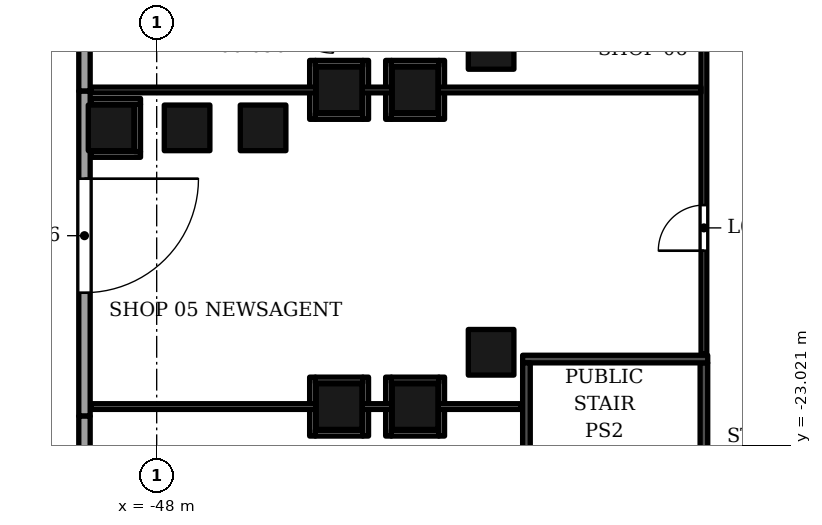
"""IFC4 building model, lengths in metres.
Left out: names, types, materials, properties, quantities, classifications, styles, units other than length and angle.
Written with IfcOpenShell. Run it as: python <this file> out.ifc"""

import sys

from ifc_helpers import new_model, si_unit, direction, frame, frame_2d, origin, origin_2d, place, context, subcontext, project, spatial, rectangle, extrude, element, fill, save


model = new_model("IFC4")
c1 = context("Model", 3, precision=1e-05, world=origin(), true_north=direction((0.0, 1.0)))
c2 = subcontext(c1, "Body", "Model", "MODEL_VIEW")
j1 = project(units=[si_unit("LENGTHUNIT", "METRE"), si_unit("PLANEANGLEUNIT", "RADIAN")], contexts=[c1])
p1 = place(None, origin())
s1 = spatial("IfcSite", under=j1, at=p1, CompositionType="ELEMENT")
p2 = place(p1, origin())
s2 = spatial("IfcBuilding", under=s1, at=p2, CompositionType="ELEMENT")
p3 = place(p2, origin())
s3 = spatial("IfcBuildingStorey", under=s2, at=p3, CompositionType="ELEMENT", Elevation=0.0)
for number, where, z_axis, x_axis in (
    (1, (-39.2, -20.572, 0.0), (0.0, 0.0, 1.0), (1.0, 0.0, 0.0)),
    (2, (-39.2, -12.524, 0.0), (0.0, 0.0, 1.0), (1.0, 0.0, 0.0)),
    (3, (-41.2, -22.001, 0.0), (0.0, 0.0, 1.0), (1.0, 0.0, 0.0)),
    (4, (-41.2, -13.667, 0.0), (0.0, 0.0, 1.0), (1.0, 0.0, 0.0)),
    (5, (-43.2, -22.001, 0.0), (0.0, 0.0, 1.0), (1.0, 0.0, 0.0)),
    (6, (-43.2, -13.667, 0.0), (0.0, 0.0, 1.0), (1.0, 0.0, 0.0)),
    (7, (-45.2, -14.667, 0.0), (0.0, 0.0, 1.0), (1.0, 0.0, 0.0)),
    (8, (-47.2, -14.667, 0.0), (0.0, 0.0, 1.0), (1.0, 0.0, 0.0)),
    (9, (-49.2, -14.667, 0.0), (0.0, 0.0, 1.0), (1.0, 0.0, 0.0)),
):
    element("IfcColumn", number, at=place(p3, frame(where, z_axis=z_axis, x_axis=x_axis)), inside=s3, PredefinedType="COLUMN", context=c2, shape_type="SweptSolid", body=[
        extrude(rectangle(XDim=1.2, YDim=1.2, at=origin_2d()), origin(), (0.0, 0.0, 1.0), 9.0),
    ])
p4 = place(p3, frame((-49.9, -7.027, 0.0), z_axis=(0.0, 0.0, 1.0), x_axis=(0.0, -1.0, 0.0)))
e10 = element("IfcWall", 10, at=p4, inside=s3, PredefinedType="ELEMENTEDWALL", context=c2, shape_type="SweptSolid", body=[
    extrude(rectangle(XDim=6.675, YDim=0.3, at=frame_2d((3.337, 0.0))), origin(), (0.0, 0.0, 1.0), 7.6),
])
p5 = place(p4, frame((2.373, 0.0, 0.0)))
e11 = element("IfcOpeningElement", 11, at=p5, cuts=e10, PredefinedType="OPENING", context=c2, shape_type="SweptSolid", body=[
    extrude(rectangle(XDim=2.0, YDim=2.4, at=frame_2d((1.0, 1.2))), frame((0.0, 0.16, 0.0), z_axis=(0.0, -1.0, 0.0), x_axis=(1.0, 0.0, 0.0)), (0.0, 0.0, 1.0), 0.32),
])
p6 = place(p3, frame((-49.9, -13.702, 0.0), z_axis=(0.0, 0.0, 1.0), x_axis=(0.0, -1.0, 0.0)))
e12 = element("IfcWall", 12, at=p6, inside=s3, PredefinedType="ELEMENTEDWALL", context=c2, shape_type="SweptSolid", body=[
    extrude(rectangle(XDim=8.55, YDim=0.3, at=frame_2d((4.275, 0.0))), origin(), (0.0, 0.0, 1.0), 7.6),
])
p7 = place(p6, frame((2.302, 0.0, 0.0)))
e13 = element("IfcOpeningElement", 13, at=p7, cuts=e12, PredefinedType="OPENING", context=c2, shape_type="SweptSolid", body=[
    extrude(rectangle(XDim=3.0, YDim=2.7, at=frame_2d((1.5, 1.35))), frame((0.0, 0.16, 0.0), z_axis=(0.0, -1.0, 0.0), x_axis=(1.0, 0.0, 0.0)), (0.0, 0.0, 1.0), 0.32),
])
p8 = place(p3, frame((-49.9, -22.252, 0.0), z_axis=(0.0, 0.0, 1.0), x_axis=(0.0, -1.0, 0.0)))
e14 = element("IfcWall", 14, at=p8, inside=s3, PredefinedType="ELEMENTEDWALL", context=c2, shape_type="SweptSolid", body=[
    extrude(rectangle(XDim=5.625, YDim=0.3, at=frame_2d((2.812, 0.0))), origin(), (0.0, 0.0, 1.0), 7.6),
])
p9 = place(p8, frame((3.248, 0.0, 0.0)))
e15 = element("IfcOpeningElement", 15, at=p9, cuts=e14, PredefinedType="OPENING", context=c2, shape_type="SweptSolid", body=[
    extrude(rectangle(XDim=2.0, YDim=2.4, at=frame_2d((1.0, 1.2))), frame((0.0, 0.16, 0.0), z_axis=(0.0, -1.0, 0.0), x_axis=(1.0, 0.0, 0.0)), (0.0, 0.0, 1.0), 0.32),
])
p10 = place(p3, frame((-49.85, -10.605, 9.0), z_axis=(0.0, 0.0, 1.0), x_axis=(0.0, -1.0, 0.0)))
e16 = element("IfcWall", 16, at=p10, inside=s3, PredefinedType="PARAPET", context=c2, shape_type="SweptSolid", body=[
    extrude(rectangle(XDim=14.698, YDim=0.3, at=frame_2d((7.349, 0.0))), origin(), (0.0, 0.0, 1.0), 1.1),
])
p11 = place(p3, frame((-38.37, -20.75, 0.0), z_axis=(0.0, 0.0, 1.0), x_axis=(1.0, 0.0, 0.0)))
e17 = element("IfcWall", 17, at=p11, inside=s3, PredefinedType="SOLIDWALL", context=c2, shape_type="SweptSolid", body=[
    extrude(rectangle(XDim=4.87, YDim=0.2, at=frame_2d((2.435, 0.0))), origin(), (0.0, 0.0, 1.0), 8.5),
])
p12 = place(p3, frame((-38.27, -27.5, 0.0), z_axis=(0.0, 0.0, 1.0), x_axis=(0.0, 1.0, 0.0)))
e18 = element("IfcWall", 18, at=p12, inside=s3, PredefinedType="SOLIDWALL", context=c2, shape_type="SweptSolid", body=[
    extrude(rectangle(XDim=6.65, YDim=0.2, at=frame_2d((3.325, 0.0))), origin(), (0.0, 0.0, 1.0), 8.5),
])
p13 = place(p12, frame((0.1, 0.0, 0.0)))
e19 = element("IfcOpeningElement", 19, at=p13, cuts=e18, PredefinedType="OPENING", context=c2, shape_type="SweptSolid", body=[
    extrude(rectangle(XDim=1.8, YDim=2.4, at=frame_2d((0.9, 1.2))), frame((0.0, 0.11, 0.0), z_axis=(0.0, -1.0, 0.0), x_axis=(1.0, 0.0, 0.0)), (0.0, 0.0, 1.0), 0.22),
])
p14 = place(p3, frame((-33.6, -27.5, 0.0), z_axis=(0.0, 0.0, 1.0), x_axis=(0.0, 1.0, 0.0)))
e20 = element("IfcWall", 20, at=p14, inside=s3, PredefinedType="SOLIDWALL", context=c2, shape_type="SweptSolid", body=[
    extrude(rectangle(XDim=6.65, YDim=0.2, at=frame_2d((3.325, 0.0))), origin(), (0.0, 0.0, 1.0), 8.5),
])
p15 = place(p14, frame((0.1, 0.0, 0.0)))
e21 = element("IfcOpeningElement", 21, at=p15, cuts=e20, PredefinedType="OPENING", context=c2, shape_type="SweptSolid", body=[
    extrude(rectangle(XDim=1.8, YDim=2.4, at=frame_2d((0.9, 1.2))), frame((0.0, 0.11, 0.0), z_axis=(0.0, -1.0, 0.0), x_axis=(1.0, 0.0, 0.0)), (0.0, 0.0, 1.0), 0.22),
])
p16 = place(p3, frame((-43.9, -22.776, 0.0), z_axis=(0.0, 0.0, 1.0), x_axis=(0.0, 1.0, 0.0)))
e22 = element("IfcWall", 22, at=p16, inside=s3, PredefinedType="PARTITIONING", context=c2, shape_type="SweptSolid", body=[
    extrude(rectangle(XDim=1.55, YDim=0.15, at=frame_2d((0.775, 0.0))), origin(), (0.0, 0.0, 1.0), 8.5),
])
p17 = place(p3, frame((-43.825, -22.701, 0.0), z_axis=(0.0, 0.0, 1.0), x_axis=(1.0, 0.0, 0.0)))
e23 = element("IfcWall", 23, at=p17, inside=s3, PredefinedType="PARTITIONING", context=c2, shape_type="SweptSolid", body=[
    extrude(rectangle(XDim=1.25, YDim=0.15, at=frame_2d((0.625, 0.0))), origin(), (0.0, 0.0, 1.0), 8.5),
])
for number, where, z_axis, x_axis in (
    (24, (-42.5, -22.776, 0.0), (0.0, 0.0, 1.0), (0.0, 1.0, 0.0)),
    (25, (-41.9, -22.776, 0.0), (0.0, 0.0, 1.0), (0.0, 1.0, 0.0)),
):
    element("IfcWall", number, at=place(p3, frame(where, z_axis=z_axis, x_axis=x_axis)), inside=s3, PredefinedType="PARTITIONING", context=c2, shape_type="SweptSolid", body=[
        extrude(rectangle(XDim=1.55, YDim=0.15, at=frame_2d((0.775, 0.0))), origin(), (0.0, 0.0, 1.0), 8.5),
    ])
p18 = place(p3, frame((-41.825, -22.701, 0.0), z_axis=(0.0, 0.0, 1.0), x_axis=(1.0, 0.0, 0.0)))
e26 = element("IfcWall", 26, at=p18, inside=s3, PredefinedType="PARTITIONING", context=c2, shape_type="SweptSolid", body=[
    extrude(rectangle(XDim=1.25, YDim=0.15, at=frame_2d((0.625, 0.0))), origin(), (0.0, 0.0, 1.0), 8.5),
])
p19 = place(p3, frame((-40.5, -22.776, 0.0), z_axis=(0.0, 0.0, 1.0), x_axis=(0.0, 1.0, 0.0)))
e27 = element("IfcWall", 27, at=p19, inside=s3, PredefinedType="PARTITIONING", context=c2, shape_type="SweptSolid", body=[
    extrude(rectangle(XDim=1.55, YDim=0.15, at=frame_2d((0.775, 0.0))), origin(), (0.0, 0.0, 1.0), 8.5),
])
p20 = place(p3, frame((-49.72, -22.0, 0.0), z_axis=(0.0, 0.0, 1.0), x_axis=(1.0, 0.0, 0.0)))
e28 = element("IfcWall", 28, at=p20, inside=s3, PredefinedType="PARTITIONING", context=c2, shape_type="SweptSolid", body=[
    extrude(rectangle(XDim=5.92, YDim=0.15, at=frame_2d((2.96, 0.0))), origin(), (0.0, 0.0, 1.0), 7.6),
])
p21 = place(p3, frame((-42.6, -22.0, 0.0), z_axis=(0.0, 0.0, 1.0), x_axis=(1.0, 0.0, 0.0)))
e29 = element("IfcWall", 29, at=p21, inside=s3, PredefinedType="PARTITIONING", context=c2, shape_type="SweptSolid", body=[
    extrude(rectangle(XDim=0.8, YDim=0.15, at=frame_2d((0.4, 0.0))), origin(), (0.0, 0.0, 1.0), 8.5),
])
p22 = place(p3, frame((-40.6, -22.0, 0.0), z_axis=(0.0, 0.0, 1.0), x_axis=(1.0, 0.0, 0.0)))
e30 = element("IfcWall", 30, at=p22, inside=s3, PredefinedType="PARTITIONING", context=c2, shape_type="SweptSolid", body=[
    extrude(rectangle(XDim=2.19, YDim=0.15, at=frame_2d((1.095, 0.0))), origin(), (0.0, 0.0, 1.0), 8.5),
])
for number, where, z_axis, x_axis in (
    (31, (-43.825, -21.301, 0.0), (0.0, 0.0, 1.0), (1.0, 0.0, 0.0)),
    (32, (-41.825, -21.301, 0.0), (0.0, 0.0, 1.0), (1.0, 0.0, 0.0)),
):
    element("IfcWall", number, at=place(p3, frame(where, z_axis=z_axis, x_axis=x_axis)), inside=s3, PredefinedType="PARTITIONING", context=c2, shape_type="SweptSolid", body=[
        extrude(rectangle(XDim=1.25, YDim=0.15, at=frame_2d((0.625, 0.0))), origin(), (0.0, 0.0, 1.0), 8.5),
    ])
p23 = place(p3, frame((-33.6, -20.61, 0.0), z_axis=(0.0, 0.0, 1.0), x_axis=(0.0, 1.0, 0.0)))
e33 = element("IfcWall", 33, at=p23, inside=s3, PredefinedType="PARTITIONING", context=c2, shape_type="SweptSolid", body=[
    extrude(rectangle(XDim=8.97, YDim=0.15, at=frame_2d((4.485, 0.0))), origin(), (0.0, 0.0, 1.0), 8.5),
])
p24 = place(p23, frame((2.711, 0.0, 0.0)))
e34 = element("IfcOpeningElement", 34, at=p24, cuts=e33, PredefinedType="OPENING", context=c2, shape_type="SweptSolid", body=[
    extrude(rectangle(XDim=1.2, YDim=2.1, at=frame_2d((0.6, 1.05))), frame((0.0, 0.085, 0.0), z_axis=(0.0, -1.0, 0.0), x_axis=(1.0, 0.0, 0.0)), (0.0, 0.0, 1.0), 0.17),
])
p25 = place(p3, frame((-49.72, -15.367, 0.0), z_axis=(0.0, 0.0, 1.0), x_axis=(1.0, 0.0, 0.0)))
e35 = element("IfcWall", 35, at=p25, inside=s3, PredefinedType="PARTITIONING", context=c2, shape_type="SweptSolid", body=[
    extrude(rectangle(XDim=1.295, YDim=0.15, at=frame_2d((0.647, 0.0))), origin(), (0.0, 0.0, 1.0), 8.5),
])
p26 = place(p3, frame((-48.5, -15.292, 0.0), z_axis=(0.0, 0.0, 1.0), x_axis=(0.0, 1.0, 0.0)))
e36 = element("IfcWall", 36, at=p26, inside=s3, PredefinedType="PARTITIONING", context=c2, shape_type="SweptSolid", body=[
    extrude(rectangle(XDim=1.25, YDim=0.15, at=frame_2d((0.625, 0.0))), origin(), (0.0, 0.0, 1.0), 8.5),
])
p27 = place(p3, frame((-43.9, -14.442, 0.0), z_axis=(0.0, 0.0, 1.0), x_axis=(0.0, 1.0, 0.0)))
e37 = element("IfcWall", 37, at=p27, inside=s3, PredefinedType="PARTITIONING", context=c2, shape_type="SweptSolid", body=[
    extrude(rectangle(XDim=1.55, YDim=0.15, at=frame_2d((0.775, 0.0))), origin(), (0.0, 0.0, 1.0), 8.5),
])
p28 = place(p3, frame((-43.825, -14.367, 0.0), z_axis=(0.0, 0.0, 1.0), x_axis=(1.0, 0.0, 0.0)))
e38 = element("IfcWall", 38, at=p28, inside=s3, PredefinedType="PARTITIONING", context=c2, shape_type="SweptSolid", body=[
    extrude(rectangle(XDim=1.25, YDim=0.15, at=frame_2d((0.625, 0.0))), origin(), (0.0, 0.0, 1.0), 8.5),
])
for number, where, z_axis, x_axis in (
    (39, (-42.5, -14.442, 0.0), (0.0, 0.0, 1.0), (0.0, 1.0, 0.0)),
    (40, (-41.9, -14.442, 0.0), (0.0, 0.0, 1.0), (0.0, 1.0, 0.0)),
):
    element("IfcWall", number, at=place(p3, frame(where, z_axis=z_axis, x_axis=x_axis)), inside=s3, PredefinedType="PARTITIONING", context=c2, shape_type="SweptSolid", body=[
        extrude(rectangle(XDim=1.55, YDim=0.15, at=frame_2d((0.775, 0.0))), origin(), (0.0, 0.0, 1.0), 8.5),
    ])
p29 = place(p3, frame((-41.825, -14.367, 0.0), z_axis=(0.0, 0.0, 1.0), x_axis=(1.0, 0.0, 0.0)))
e41 = element("IfcWall", 41, at=p29, inside=s3, PredefinedType="PARTITIONING", context=c2, shape_type="SweptSolid", body=[
    extrude(rectangle(XDim=1.25, YDim=0.15, at=frame_2d((0.625, 0.0))), origin(), (0.0, 0.0, 1.0), 8.5),
])
p30 = place(p3, frame((-40.5, -14.442, 0.0), z_axis=(0.0, 0.0, 1.0), x_axis=(0.0, 1.0, 0.0)))
e42 = element("IfcWall", 42, at=p30, inside=s3, PredefinedType="PARTITIONING", context=c2, shape_type="SweptSolid", body=[
    extrude(rectangle(XDim=1.55, YDim=0.15, at=frame_2d((0.775, 0.0))), origin(), (0.0, 0.0, 1.0), 8.5),
])
p31 = place(p3, frame((-49.72, -13.967, 0.0), z_axis=(0.0, 0.0, 1.0), x_axis=(1.0, 0.0, 0.0)))
e43 = element("IfcWall", 43, at=p31, inside=s3, PredefinedType="PARTITIONING", context=c2, shape_type="SweptSolid", body=[
    extrude(rectangle(XDim=1.295, YDim=0.15, at=frame_2d((0.647, 0.0))), origin(), (0.0, 0.0, 1.0), 8.5),
])
p32 = place(p3, frame((-49.72, -13.67, 0.0), z_axis=(0.0, 0.0, 1.0), x_axis=(1.0, 0.0, 0.0)))
e44 = element("IfcWall", 44, at=p32, inside=s3, PredefinedType="PARTITIONING", context=c2, shape_type="SweptSolid", body=[
    extrude(rectangle(XDim=5.92, YDim=0.15, at=frame_2d((2.96, 0.0))), origin(), (0.0, 0.0, 1.0), 7.6),
])
p33 = place(p3, frame((-42.6, -13.67, 0.0), z_axis=(0.0, 0.0, 1.0), x_axis=(1.0, 0.0, 0.0)))
e45 = element("IfcWall", 45, at=p33, inside=s3, PredefinedType="PARTITIONING", context=c2, shape_type="SweptSolid", body=[
    extrude(rectangle(XDim=0.8, YDim=0.15, at=frame_2d((0.4, 0.0))), origin(), (0.0, 0.0, 1.0), 8.5),
])
p34 = place(p3, frame((-40.6, -13.67, 0.0), z_axis=(0.0, 0.0, 1.0), x_axis=(1.0, 0.0, 0.0)))
e46 = element("IfcWall", 46, at=p34, inside=s3, PredefinedType="PARTITIONING", context=c2, shape_type="SweptSolid", body=[
    extrude(rectangle(XDim=6.925, YDim=0.15, at=frame_2d((3.462, 0.0))), origin(), (0.0, 0.0, 1.0), 8.5),
])
for number, where, z_axis, x_axis in (
    (47, (-43.825, -12.967, 0.0), (0.0, 0.0, 1.0), (1.0, 0.0, 0.0)),
    (48, (-41.825, -12.967, 0.0), (0.0, 0.0, 1.0), (1.0, 0.0, 0.0)),
):
    element("IfcWall", number, at=place(p3, frame(where, z_axis=z_axis, x_axis=x_axis)), inside=s3, PredefinedType="PARTITIONING", context=c2, shape_type="SweptSolid", body=[
        extrude(rectangle(XDim=1.25, YDim=0.15, at=frame_2d((0.625, 0.0))), origin(), (0.0, 0.0, 1.0), 8.5),
    ])
p35 = place(p7, origin())
e49 = element("IfcDoor", 49, at=p35, inside=s3, OperationType="DOUBLE_DOOR_SINGLE_SWING", PredefinedType="DOOR", context=c2, shape_type="SweptSolid", body=[
    extrude(rectangle(XDim=3.0, YDim=2.7, at=frame_2d((1.5, 1.35))), frame((0.0, 0.025, 0.0), z_axis=(0.0, -1.0, 0.0), x_axis=(1.0, 0.0, 0.0)), (0.0, 0.0, 1.0), 0.05),
])
fill(e13, e49)
p36 = place(p24, origin())
e50 = element("IfcDoor", 50, at=p36, inside=s3, OperationType="SINGLE_SWING_LEFT", PredefinedType="DOOR", context=c2, shape_type="SweptSolid", body=[
    extrude(rectangle(XDim=1.2, YDim=2.1, at=frame_2d((0.6, 1.05))), frame((0.0, 0.025, 0.0), z_axis=(0.0, -1.0, 0.0), x_axis=(1.0, 0.0, 0.0)), (0.0, 0.0, 1.0), 0.05),
])
fill(e34, e50)
save(model, sys.argv[1])
